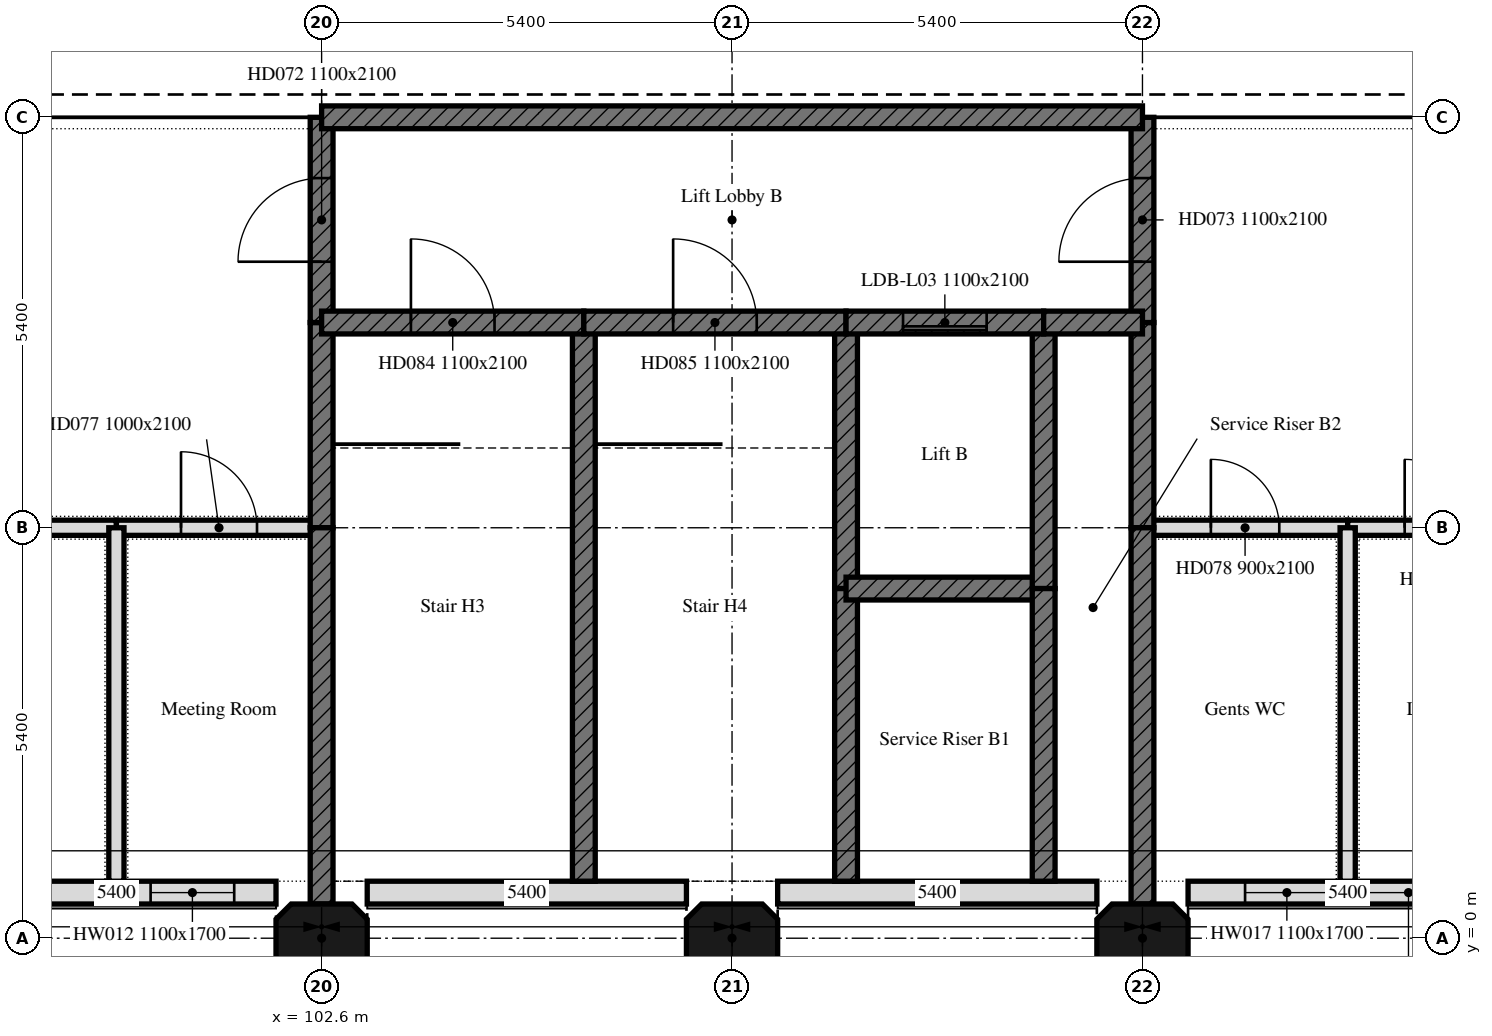
"""IFC4 building model, lengths in metres.
Left out: names, types, materials, properties, quantities, classifications, styles, units other than length and angle.
Written with IfcOpenShell. Run it as: python <this file> out.ifc"""

import sys

from ifc_helpers import new_model, si_unit, direction, frame, frame_2d, origin, place, context, subcontext, project, spatial, polyline, rectangle, outline, extrude, element, fill, save


model = new_model("IFC4")
c1 = context("Model", 3, precision=1e-05, world=origin(), true_north=direction((0.0, 1.0)))
c2 = subcontext(c1, "Body", "Model", "MODEL_VIEW")
j1 = project(units=[si_unit("LENGTHUNIT", "METRE"), si_unit("PLANEANGLEUNIT", "RADIAN")], contexts=[c1])
p1 = place(None, origin())
s1 = spatial("IfcSite", under=j1, at=p1, CompositionType="ELEMENT")
p2 = place(p1, origin())
s2 = spatial("IfcBuilding", under=s1, at=p2, CompositionType="ELEMENT")
p3 = place(p2, frame((0.0, 0.0, 19.8)))
s3 = spatial("IfcBuildingStorey", under=s2, at=p3, CompositionType="ELEMENT", Elevation=19.8)
for number, where, z_axis, x_axis in (
    (1, (102.6, 0.0, 0.0), (0.0, 0.0, 1.0), (1.0, 0.0, 0.0)),
    (2, (108.0, 0.0, 0.0), (0.0, 0.0, 1.0), (1.0, 0.0, 0.0)),
    (3, (113.4, 0.0, 0.0), (0.0, 0.0, 1.0), (1.0, 0.0, 0.0)),
):
    element("IfcColumn", number, at=place(p3, frame(where, z_axis=z_axis, x_axis=x_axis)), inside=s3, PredefinedType="COLUMN", context=c2, shape_type="SweptSolid", body=[
        extrude(outline(polyline([(-0.4, -0.45), (0.4, -0.45), (0.6, -0.25), (0.6, 0.25), (0.4, 0.45), (-0.4, 0.45), (-0.6, 0.25), (-0.6, -0.25), (-0.4, -0.45)])), origin(), (0.0, 0.0, 1.0), 3.802),
    ])
p4 = place(p3, frame((97.8, 0.6, 0.0), z_axis=(0.0, 0.0, 1.0), x_axis=(1.0, 0.0, 0.0)))
e4 = element("IfcWall", 4, at=p4, inside=s3, PredefinedType="SOLIDWALL", context=c2, shape_type="SweptSolid", body=[
    extrude(outline(polyline([(0.0, 0.0), (4.2, 0.0), (4.2, 5.365), (0.0, 5.365), (0.0, 0.0)])), frame((0.0, 0.15, 0.0), z_axis=(0.0, -1.0, 0.0), x_axis=(1.0, 0.0, 0.0)), (0.0, 0.0, 1.0), 0.3),
])
p5 = place(p4, frame((2.55, 0.0, 0.9)))
e5 = element("IfcOpeningElement", 5, at=p5, cuts=e4, PredefinedType="OPENING", context=c2, shape_type="SweptSolid", body=[
    extrude(rectangle(XDim=1.1, YDim=1.7, at=frame_2d((0.55, 0.85))), frame((0.0, 0.15, 0.0), z_axis=(0.0, -1.0, 0.0), x_axis=(1.0, 0.0, 0.0)), (0.0, 0.0, 1.0), 0.3),
])
for number, where, z_axis, x_axis in (
    (6, (103.2, 0.6, 0.0), (0.0, 0.0, 1.0), (1.0, 0.0, 0.0)),
    (7, (108.6, 0.6, 0.0), (0.0, 0.0, 1.0), (1.0, 0.0, 0.0)),
):
    element("IfcWall", number, at=place(p3, frame(where, z_axis=z_axis, x_axis=x_axis)), inside=s3, PredefinedType="SOLIDWALL", context=c2, shape_type="SweptSolid", body=[
        extrude(outline(polyline([(0.0, 0.0), (4.2, 0.0), (4.2, 5.365), (0.0, 5.365), (0.0, 0.0)])), frame((0.0, 0.15, 0.0), z_axis=(0.0, -1.0, 0.0), x_axis=(1.0, 0.0, 0.0)), (0.0, 0.0, 1.0), 0.3),
    ])
p6 = place(p3, frame((114.0, 0.6, 0.0), z_axis=(0.0, 0.0, 1.0), x_axis=(1.0, 0.0, 0.0)))
e8 = element("IfcWall", 8, at=p6, inside=s3, PredefinedType="SOLIDWALL", context=c2, shape_type="SweptSolid", body=[
    extrude(outline(polyline([(0.0, 0.0), (4.2, 0.0), (4.2, 5.365), (0.0, 5.365), (0.0, 0.0)])), frame((0.0, 0.15, 0.0), z_axis=(0.0, -1.0, 0.0), x_axis=(1.0, 0.0, 0.0)), (0.0, 0.0, 1.0), 0.3),
])
p7 = place(p6, frame((0.75, 0.0, 0.9)))
e9 = element("IfcOpeningElement", 9, at=p7, cuts=e8, PredefinedType="OPENING", context=c2, shape_type="SweptSolid", body=[
    extrude(rectangle(XDim=1.1, YDim=1.7, at=frame_2d((0.55, 0.85))), frame((0.0, 0.15, 0.0), z_axis=(0.0, -1.0, 0.0), x_axis=(1.0, 0.0, 0.0)), (0.0, 0.0, 1.0), 0.3),
])
p8 = place(p6, frame((2.35, 0.0, 0.9)))
e10 = element("IfcOpeningElement", 10, at=p8, cuts=e8, PredefinedType="OPENING", context=c2, shape_type="SweptSolid", body=[
    extrude(rectangle(XDim=1.1, YDim=1.7, at=frame_2d((0.55, 0.85))), frame((0.0, 0.15, 0.0), z_axis=(0.0, -1.0, 0.0), x_axis=(1.0, 0.0, 0.0)), (0.0, 0.0, 1.0), 0.3),
])
p9 = place(p3, frame((97.5, 5.4, 0.0), z_axis=(0.0, 0.0, 1.0), x_axis=(1.0, 0.0, 0.0)))
e11 = element("IfcWall", 11, at=p9, inside=s3, PredefinedType="PARTITIONING", context=c2, shape_type="SweptSolid", body=[
    extrude(rectangle(XDim=2.4, YDim=0.2, at=frame_2d((1.2, 0.0))), origin(), (0.0, 0.0, 1.0), 5.317),
])
p10 = place(p3, frame((99.9, 5.4, 0.0), z_axis=(0.0, 0.0, 1.0), x_axis=(1.0, 0.0, 0.0)))
e12 = element("IfcWall", 12, at=p10, inside=s3, PredefinedType="PARTITIONING", context=c2, shape_type="SweptSolid", body=[
    extrude(rectangle(XDim=2.7, YDim=0.2, at=frame_2d((1.35, 0.0))), origin(), (0.0, 0.0, 1.0), 5.317),
])
p11 = place(p10, frame((0.85, 0.0, 0.0)))
e13 = element("IfcOpeningElement", 13, at=p11, cuts=e12, PredefinedType="OPENING", context=c2, shape_type="SweptSolid", body=[
    extrude(rectangle(XDim=1.0, YDim=2.1, at=frame_2d((0.5, 1.05))), frame((0.0, 0.1, 0.0), z_axis=(0.0, -1.0, 0.0), x_axis=(1.0, 0.0, 0.0)), (0.0, 0.0, 1.0), 0.2),
])
p12 = place(p3, frame((102.6, 5.4, 0.0), z_axis=(0.0, 0.0, 1.0), x_axis=(0.0, 1.0, 0.0)))
e14 = element("IfcWall", 14, at=p12, inside=s3, PredefinedType="SHEAR", context=c2, shape_type="SweptSolid", body=[
    extrude(outline(polyline([(0.0, 0.0), (2.7, 0.0), (2.7, 6.067), (0.0, 5.344), (0.0, 0.0)])), frame((0.0, 0.15, 0.0), z_axis=(0.0, -1.0, 0.0), x_axis=(1.0, 0.0, 0.0)), (0.0, 0.0, 1.0), 0.3),
])
p13 = place(p3, frame((102.6, 8.1, 0.0), z_axis=(0.0, 0.0, 1.0), x_axis=(0.0, 1.0, 0.0)))
e15 = element("IfcWall", 15, at=p13, inside=s3, PredefinedType="SHEAR", context=c2, shape_type="SweptSolid", body=[
    extrude(outline(polyline([(0.0, 0.0), (2.7, 0.0), (2.7, 6.791), (0.0, 6.067), (0.0, 0.0)])), frame((0.0, 0.15, 0.0), z_axis=(0.0, -1.0, 0.0), x_axis=(1.0, 0.0, 0.0)), (0.0, 0.0, 1.0), 0.3),
])
p14 = place(p13, frame((0.8, 0.0, 0.0)))
e16 = element("IfcOpeningElement", 16, at=p14, cuts=e15, PredefinedType="OPENING", context=c2, shape_type="SweptSolid", body=[
    extrude(rectangle(XDim=1.1, YDim=2.1, at=frame_2d((0.55, 1.05))), frame((0.0, 0.15, 0.0), z_axis=(0.0, -1.0, 0.0), x_axis=(1.0, 0.0, 0.0)), (0.0, 0.0, 1.0), 0.3),
])
p15 = place(p3, frame((113.4, 5.4, 0.0), z_axis=(0.0, 0.0, 1.0), x_axis=(1.0, 0.0, 0.0)))
e17 = element("IfcWall", 17, at=p15, inside=s3, PredefinedType="PARTITIONING", context=c2, shape_type="SweptSolid", body=[
    extrude(rectangle(XDim=2.7, YDim=0.2, at=frame_2d((1.35, 0.0))), origin(), (0.0, 0.0, 1.0), 5.317),
])
p16 = place(p15, frame((0.9, 0.0, 0.0)))
e18 = element("IfcOpeningElement", 18, at=p16, cuts=e17, PredefinedType="OPENING", context=c2, shape_type="SweptSolid", body=[
    extrude(rectangle(XDim=0.9, YDim=2.1, at=frame_2d((0.45, 1.05))), frame((0.0, 0.1, 0.0), z_axis=(0.0, -1.0, 0.0), x_axis=(1.0, 0.0, 0.0)), (0.0, 0.0, 1.0), 0.2),
])
p17 = place(p3, frame((116.1, 5.4, 0.0), z_axis=(0.0, 0.0, 1.0), x_axis=(1.0, 0.0, 0.0)))
e19 = element("IfcWall", 19, at=p17, inside=s3, PredefinedType="PARTITIONING", context=c2, shape_type="SweptSolid", body=[
    extrude(rectangle(XDim=2.4, YDim=0.2, at=frame_2d((1.2, 0.0))), origin(), (0.0, 0.0, 1.0), 5.317),
])
p18 = place(p17, frame((0.75, 0.0, 0.0)))
e20 = element("IfcOpeningElement", 20, at=p18, cuts=e19, PredefinedType="OPENING", context=c2, shape_type="SweptSolid", body=[
    extrude(rectangle(XDim=0.9, YDim=2.1, at=frame_2d((0.45, 1.05))), frame((0.0, 0.1, 0.0), z_axis=(0.0, -1.0, 0.0), x_axis=(1.0, 0.0, 0.0)), (0.0, 0.0, 1.0), 0.2),
])
p19 = place(p3, frame((113.4, 5.4, 0.0), z_axis=(0.0, 0.0, 1.0), x_axis=(0.0, 1.0, 0.0)))
e21 = element("IfcWall", 21, at=p19, inside=s3, PredefinedType="SHEAR", context=c2, shape_type="SweptSolid", body=[
    extrude(outline(polyline([(0.0, 0.0), (2.7, 0.0), (2.7, 6.067), (0.0, 5.344), (0.0, 0.0)])), frame((0.0, 0.15, 0.0), z_axis=(0.0, -1.0, 0.0), x_axis=(1.0, 0.0, 0.0)), (0.0, 0.0, 1.0), 0.3),
])
p20 = place(p3, frame((113.4, 8.1, 0.0), z_axis=(0.0, 0.0, 1.0), x_axis=(0.0, 1.0, 0.0)))
e22 = element("IfcWall", 22, at=p20, inside=s3, PredefinedType="SHEAR", context=c2, shape_type="SweptSolid", body=[
    extrude(outline(polyline([(0.0, 0.0), (2.7, 0.0), (2.7, 6.791), (0.0, 6.067), (0.0, 0.0)])), frame((0.0, 0.15, 0.0), z_axis=(0.0, -1.0, 0.0), x_axis=(1.0, 0.0, 0.0)), (0.0, 0.0, 1.0), 0.3),
])
p21 = place(p20, frame((0.8, 0.0, 0.0)))
e23 = element("IfcOpeningElement", 23, at=p21, cuts=e22, PredefinedType="OPENING", context=c2, shape_type="SweptSolid", body=[
    extrude(rectangle(XDim=1.1, YDim=2.1, at=frame_2d((0.55, 1.05))), frame((0.0, 0.15, 0.0), z_axis=(0.0, -1.0, 0.0), x_axis=(1.0, 0.0, 0.0)), (0.0, 0.0, 1.0), 0.3),
])
p22 = place(p3, frame((99.9, 0.75, 0.0), z_axis=(0.0, 0.0, 1.0), x_axis=(0.0, 1.0, 0.0)))
e24 = element("IfcWall", 24, at=p22, inside=s3, PredefinedType="PARTITIONING", context=c2, shape_type="SweptSolid", body=[
    extrude(outline(polyline([(0.0, 0.0), (4.65, 0.0), (4.65, 5.344), (0.0, 4.098), (0.0, 0.0)])), frame((0.0, 0.1, 0.0), z_axis=(0.0, -1.0, 0.0), x_axis=(1.0, 0.0, 0.0)), (0.0, 0.0, 1.0), 0.2),
])
p23 = place(p3, frame((102.6, 0.45, 0.0), z_axis=(0.0, 0.0, 1.0), x_axis=(0.0, 1.0, 0.0)))
e25 = element("IfcWall", 25, at=p23, inside=s3, PredefinedType="SHEAR", context=c2, shape_type="SweptSolid", body=[
    extrude(outline(polyline([(0.0, 0.0), (4.95, 0.0), (4.95, 5.344), (0.0, 4.018), (0.0, 0.0)])), frame((0.0, 0.15, 0.0), z_axis=(0.0, -1.0, 0.0), x_axis=(1.0, 0.0, 0.0)), (0.0, 0.0, 1.0), 0.3),
])
p24 = place(p3, frame((116.1, 0.75, 0.0), z_axis=(0.0, 0.0, 1.0), x_axis=(0.0, 1.0, 0.0)))
e26 = element("IfcWall", 26, at=p24, inside=s3, PredefinedType="PARTITIONING", context=c2, shape_type="SweptSolid", body=[
    extrude(outline(polyline([(0.0, 0.0), (4.65, 0.0), (4.65, 5.344), (0.0, 4.098), (0.0, 0.0)])), frame((0.0, 0.1, 0.0), z_axis=(0.0, -1.0, 0.0), x_axis=(1.0, 0.0, 0.0)), (0.0, 0.0, 1.0), 0.2),
])
p25 = place(p3, frame((113.4, 0.45, 0.0), z_axis=(0.0, 0.0, 1.0), x_axis=(0.0, 1.0, 0.0)))
e27 = element("IfcWall", 27, at=p25, inside=s3, PredefinedType="SHEAR", context=c2, shape_type="SweptSolid", body=[
    extrude(outline(polyline([(0.0, 0.0), (4.95, 0.0), (4.95, 5.344), (0.0, 4.018), (0.0, 0.0)])), frame((0.0, 0.15, 0.0), z_axis=(0.0, -1.0, 0.0), x_axis=(1.0, 0.0, 0.0)), (0.0, 0.0, 1.0), 0.3),
])
p26 = place(p3, frame((106.05, 0.75, 0.0), z_axis=(0.0, 0.0, 1.0), x_axis=(0.0, 1.0, 0.0)))
e28 = element("IfcWall", 28, at=p26, inside=s3, PredefinedType="SHEAR", context=c2, shape_type="SweptSolid", body=[
    extrude(outline(polyline([(0.0, 0.0), (7.35, 0.0), (7.35, 6.067), (0.0, 4.098), (0.0, 0.0)])), frame((0.0, 0.15, 0.0), z_axis=(0.0, -1.0, 0.0), x_axis=(1.0, 0.0, 0.0)), (0.0, 0.0, 1.0), 0.3),
])
p27 = place(p3, frame((102.6, 8.1, 0.0), z_axis=(0.0, 0.0, 1.0), x_axis=(1.0, 0.0, 0.0)))
e29 = element("IfcWall", 29, at=p27, inside=s3, PredefinedType="SHEAR", context=c2, shape_type="SweptSolid", body=[
    extrude(rectangle(XDim=3.45, YDim=0.3, at=frame_2d((1.725, 0.0))), origin(), (0.0, 0.0, 1.0), 6.027),
])
p28 = place(p27, frame((1.175, 0.0, 0.0)))
e30 = element("IfcOpeningElement", 30, at=p28, cuts=e29, PredefinedType="OPENING", context=c2, shape_type="SweptSolid", body=[
    extrude(rectangle(XDim=1.1, YDim=2.1, at=frame_2d((0.55, 1.05))), frame((0.0, 0.15, 0.0), z_axis=(0.0, -1.0, 0.0), x_axis=(1.0, 0.0, 0.0)), (0.0, 0.0, 1.0), 0.3),
])
p29 = place(p3, frame((109.5, 4.6, 0.0), z_axis=(0.0, 0.0, 1.0), x_axis=(0.0, 1.0, 0.0)))
e31 = element("IfcWall", 31, at=p29, inside=s3, PredefinedType="SHEAR", context=c2, shape_type="SweptSolid", body=[
    extrude(outline(polyline([(0.0, 0.0), (3.5, 0.0), (3.5, 6.067), (0.0, 5.13), (0.0, 0.0)])), frame((0.0, 0.15, 0.0), z_axis=(0.0, -1.0, 0.0), x_axis=(1.0, 0.0, 0.0)), (0.0, 0.0, 1.0), 0.3),
])
p30 = place(p3, frame((109.5, 0.75, 0.0), z_axis=(0.0, 0.0, 1.0), x_axis=(0.0, 1.0, 0.0)))
e32 = element("IfcWall", 32, at=p30, inside=s3, PredefinedType="SHEAR", context=c2, shape_type="SweptSolid", body=[
    extrude(outline(polyline([(0.0, 0.0), (3.85, 0.0), (3.85, 5.13), (0.0, 4.098), (0.0, 0.0)])), frame((0.0, 0.15, 0.0), z_axis=(0.0, -1.0, 0.0), x_axis=(1.0, 0.0, 0.0)), (0.0, 0.0, 1.0), 0.3),
])
p31 = place(p3, frame((106.05, 8.1, 0.0), z_axis=(0.0, 0.0, 1.0), x_axis=(1.0, 0.0, 0.0)))
e33 = element("IfcWall", 33, at=p31, inside=s3, PredefinedType="SHEAR", context=c2, shape_type="SweptSolid", body=[
    extrude(rectangle(XDim=3.45, YDim=0.3, at=frame_2d((1.725, 0.0))), origin(), (0.0, 0.0, 1.0), 6.027),
])
p32 = place(p31, frame((1.175, 0.0, 0.0)))
e34 = element("IfcOpeningElement", 34, at=p32, cuts=e33, PredefinedType="OPENING", context=c2, shape_type="SweptSolid", body=[
    extrude(rectangle(XDim=1.1, YDim=2.1, at=frame_2d((0.55, 1.05))), frame((0.0, 0.15, 0.0), z_axis=(0.0, -1.0, 0.0), x_axis=(1.0, 0.0, 0.0)), (0.0, 0.0, 1.0), 0.3),
])
p33 = place(p3, frame((109.5, 4.6, 0.0), z_axis=(0.0, 0.0, 1.0), x_axis=(1.0, 0.0, 0.0)))
e35 = element("IfcWall", 35, at=p33, inside=s3, PredefinedType="SHEAR", context=c2, shape_type="SweptSolid", body=[
    extrude(rectangle(XDim=2.6, YDim=0.3, at=frame_2d((1.3, 0.0))), origin(), (0.0, 0.0, 1.0), 5.089),
])
p34 = place(p3, frame((112.1, 4.6, 0.0), z_axis=(0.0, 0.0, 1.0), x_axis=(0.0, 1.0, 0.0)))
e36 = element("IfcWall", 36, at=p34, inside=s3, PredefinedType="SHEAR", context=c2, shape_type="SweptSolid", body=[
    extrude(outline(polyline([(0.0, 0.0), (3.5, 0.0), (3.5, 6.067), (0.0, 5.13), (0.0, 0.0)])), frame((0.0, 0.15, 0.0), z_axis=(0.0, -1.0, 0.0), x_axis=(1.0, 0.0, 0.0)), (0.0, 0.0, 1.0), 0.3),
])
p35 = place(p3, frame((109.5, 8.1, 0.0), z_axis=(0.0, 0.0, 1.0), x_axis=(1.0, 0.0, 0.0)))
e37 = element("IfcWall", 37, at=p35, inside=s3, PredefinedType="SHEAR", context=c2, shape_type="SweptSolid", body=[
    extrude(rectangle(XDim=2.6, YDim=0.3, at=frame_2d((1.3, 0.0))), origin(), (0.0, 0.0, 1.0), 6.027),
])
p36 = place(p35, frame((0.75, 0.0, 0.0)))
e38 = element("IfcOpeningElement", 38, at=p36, cuts=e37, PredefinedType="OPENING", context=c2, shape_type="SweptSolid", body=[
    extrude(rectangle(XDim=1.1, YDim=2.1, at=frame_2d((0.55, 1.05))), frame((0.0, 0.15, 0.0), z_axis=(0.0, -1.0, 0.0), x_axis=(1.0, 0.0, 0.0)), (0.0, 0.0, 1.0), 0.3),
])
p37 = place(p3, frame((112.1, 0.75, 0.0), z_axis=(0.0, 0.0, 1.0), x_axis=(0.0, 1.0, 0.0)))
e39 = element("IfcWall", 39, at=p37, inside=s3, PredefinedType="SHEAR", context=c2, shape_type="SweptSolid", body=[
    extrude(outline(polyline([(0.0, 0.0), (3.85, 0.0), (3.85, 5.13), (0.0, 4.098), (0.0, 0.0)])), frame((0.0, 0.15, 0.0), z_axis=(0.0, -1.0, 0.0), x_axis=(1.0, 0.0, 0.0)), (0.0, 0.0, 1.0), 0.3),
])
p38 = place(p3, frame((112.1, 8.1, 0.0), z_axis=(0.0, 0.0, 1.0), x_axis=(1.0, 0.0, 0.0)))
e40 = element("IfcWall", 40, at=p38, inside=s3, PredefinedType="SHEAR", context=c2, shape_type="SweptSolid", body=[
    extrude(rectangle(XDim=1.3, YDim=0.3, at=frame_2d((0.65, 0.0))), origin(), (0.0, 0.0, 1.0), 6.027),
])
p39 = place(p3, frame((102.6, 10.8, 0.0), z_axis=(0.0, 0.0, 1.0), x_axis=(1.0, 0.0, 0.0)))
e41 = element("IfcWall", 41, at=p39, inside=s3, PredefinedType="SHEAR", context=c2, shape_type="SweptSolid", body=[
    extrude(rectangle(XDim=10.8, YDim=0.3, at=frame_2d((5.4, 0.0))), origin(), (0.0, 0.0, 1.0), 6.751),
])
p40 = place(p5, origin())
e42 = element("IfcWindow", 42, at=p40, inside=s3, PartitioningType="SINGLE_PANEL", PredefinedType="WINDOW", context=c2, shape_type="SweptSolid", body=[
    extrude(rectangle(XDim=1.1, YDim=1.7, at=frame_2d((0.55, 0.85))), frame((0.0, 0.03, 0.0), z_axis=(0.0, -1.0, 0.0), x_axis=(1.0, 0.0, 0.0)), (0.0, 0.0, 1.0), 0.06),
])
fill(e5, e42)
p41 = place(p7, origin())
e43 = element("IfcWindow", 43, at=p41, inside=s3, PartitioningType="SINGLE_PANEL", PredefinedType="WINDOW", context=c2, shape_type="SweptSolid", body=[
    extrude(rectangle(XDim=1.1, YDim=1.7, at=frame_2d((0.55, 0.85))), frame((0.0, 0.03, 0.0), z_axis=(0.0, -1.0, 0.0), x_axis=(1.0, 0.0, 0.0)), (0.0, 0.0, 1.0), 0.06),
])
fill(e9, e43)
p42 = place(p8, origin())
e44 = element("IfcWindow", 44, at=p42, inside=s3, PartitioningType="SINGLE_PANEL", PredefinedType="WINDOW", context=c2, shape_type="SweptSolid", body=[
    extrude(rectangle(XDim=1.1, YDim=1.7, at=frame_2d((0.55, 0.85))), frame((0.0, 0.03, 0.0), z_axis=(0.0, -1.0, 0.0), x_axis=(1.0, 0.0, 0.0)), (0.0, 0.0, 1.0), 0.06),
])
fill(e10, e44)
p43 = place(p14, origin())
e45 = element("IfcDoor", 45, at=p43, inside=s3, OperationType="SINGLE_SWING_LEFT", PredefinedType="DOOR", context=c2, shape_type="SweptSolid", body=[
    extrude(rectangle(XDim=1.1, YDim=2.1, at=frame_2d((0.55, 1.05))), frame((0.0, 0.025, 0.0), z_axis=(0.0, -1.0, 0.0), x_axis=(1.0, 0.0, 0.0)), (0.0, 0.0, 1.0), 0.05),
])
fill(e16, e45)
p44 = place(p21, origin())
e46 = element("IfcDoor", 46, at=p44, inside=s3, OperationType="SINGLE_SWING_LEFT", PredefinedType="DOOR", context=c2, shape_type="SweptSolid", body=[
    extrude(rectangle(XDim=1.1, YDim=2.1, at=frame_2d((0.55, 1.05))), frame((0.0, 0.025, 0.0), z_axis=(0.0, -1.0, 0.0), x_axis=(1.0, 0.0, 0.0)), (0.0, 0.0, 1.0), 0.05),
])
fill(e23, e46)
p45 = place(p11, origin())
e47 = element("IfcDoor", 47, at=p45, inside=s3, OperationType="SINGLE_SWING_LEFT", PredefinedType="DOOR", context=c2, shape_type="SweptSolid", body=[
    extrude(rectangle(XDim=1.0, YDim=2.1, at=frame_2d((0.5, 1.05))), frame((0.0, 0.025, 0.0), z_axis=(0.0, -1.0, 0.0), x_axis=(1.0, 0.0, 0.0)), (0.0, 0.0, 1.0), 0.05),
])
fill(e13, e47)
p46 = place(p16, origin())
e48 = element("IfcDoor", 48, at=p46, inside=s3, OperationType="SINGLE_SWING_LEFT", PredefinedType="DOOR", context=c2, shape_type="SweptSolid", body=[
    extrude(rectangle(XDim=0.9, YDim=2.1, at=frame_2d((0.45, 1.05))), frame((0.0, 0.025, 0.0), z_axis=(0.0, -1.0, 0.0), x_axis=(1.0, 0.0, 0.0)), (0.0, 0.0, 1.0), 0.05),
])
fill(e18, e48)
p47 = place(p18, origin())
e49 = element("IfcDoor", 49, at=p47, inside=s3, OperationType="SINGLE_SWING_LEFT", PredefinedType="DOOR", context=c2, shape_type="SweptSolid", body=[
    extrude(rectangle(XDim=0.9, YDim=2.1, at=frame_2d((0.45, 1.05))), frame((0.0, 0.025, 0.0), z_axis=(0.0, -1.0, 0.0), x_axis=(1.0, 0.0, 0.0)), (0.0, 0.0, 1.0), 0.05),
])
fill(e20, e49)
p48 = place(p28, origin())
e50 = element("IfcDoor", 50, at=p48, inside=s3, OperationType="SINGLE_SWING_LEFT", PredefinedType="DOOR", context=c2, shape_type="SweptSolid", body=[
    extrude(rectangle(XDim=1.1, YDim=2.1, at=frame_2d((0.55, 1.05))), frame((0.0, 0.025, 0.0), z_axis=(0.0, -1.0, 0.0), x_axis=(1.0, 0.0, 0.0)), (0.0, 0.0, 1.0), 0.05),
])
fill(e30, e50)
p49 = place(p32, origin())
e51 = element("IfcDoor", 51, at=p49, inside=s3, OperationType="SINGLE_SWING_LEFT", PredefinedType="DOOR", context=c2, shape_type="SweptSolid", body=[
    extrude(rectangle(XDim=1.1, YDim=2.1, at=frame_2d((0.55, 1.05))), frame((0.0, 0.025, 0.0), z_axis=(0.0, -1.0, 0.0), x_axis=(1.0, 0.0, 0.0)), (0.0, 0.0, 1.0), 0.05),
])
fill(e34, e51)
p50 = place(p36, origin())
e52 = element("IfcDoor", 52, at=p50, inside=s3, OperationType="SLIDING_TO_LEFT", PredefinedType="DOOR", context=c2, shape_type="SweptSolid", body=[
    extrude(rectangle(XDim=1.1, YDim=2.1, at=frame_2d((0.55, 1.05))), frame((0.0, 0.025, 0.0), z_axis=(0.0, -1.0, 0.0), x_axis=(1.0, 0.0, 0.0)), (0.0, 0.0, 1.0), 0.05),
])
fill(e38, e52)
save(model, sys.argv[1])
